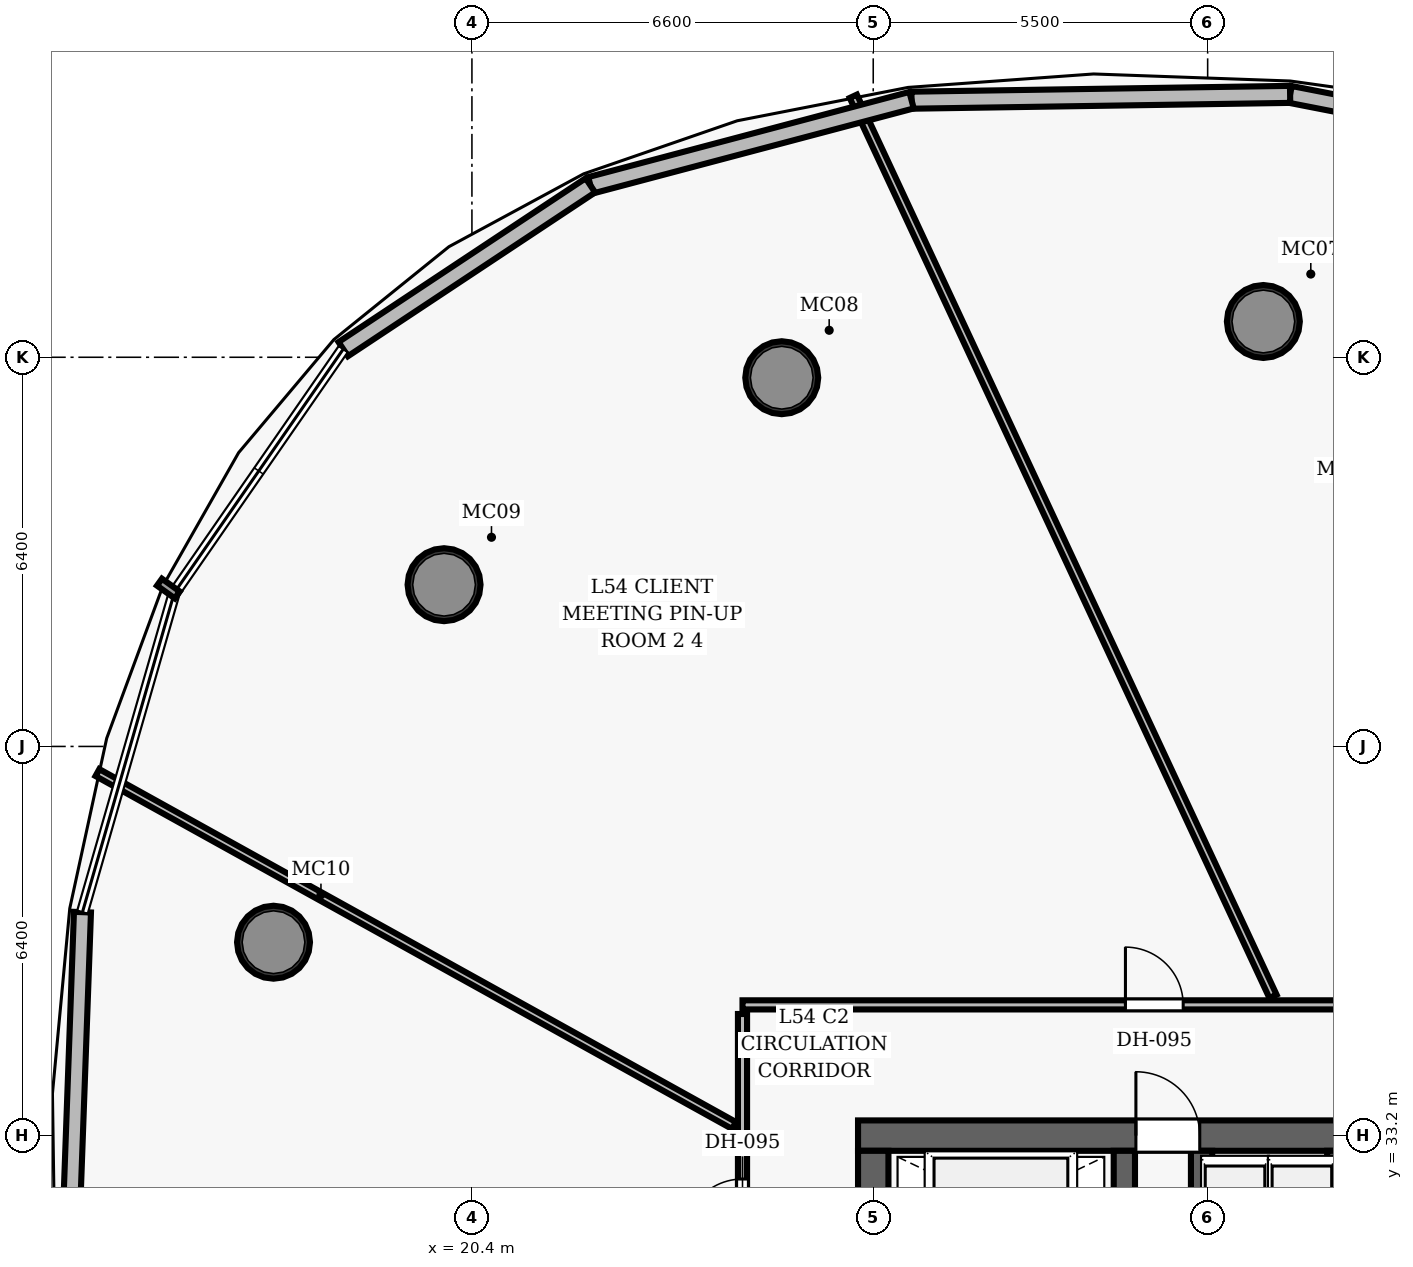
"""IFC4 building model, lengths in metres.
Left out: names, types, materials, properties, quantities, classifications, styles, units other than length and angle.
Written with IfcOpenShell. Run it as: python <this file> out.ifc"""

import sys

from ifc_helpers import new_model, si_unit, direction, frame, frame_2d, origin, origin_2d, place, context, subcontext, project, spatial, rectangle, hollow_circle, extrude, element, fill, save


model = new_model("IFC4")
c1 = context("Model", 3, precision=1e-05, world=origin(), true_north=direction((0.0, 1.0)))
c2 = subcontext(c1, "Body", "Model", "MODEL_VIEW")
j1 = project(units=[si_unit("LENGTHUNIT", "METRE"), si_unit("PLANEANGLEUNIT", "RADIAN")], contexts=[c1])
p1 = place(None, origin())
s1 = spatial("IfcSite", under=j1, at=p1, CompositionType="ELEMENT")
p2 = place(p1, origin())
s2 = spatial("IfcBuilding", under=s1, at=p2, CompositionType="ELEMENT")
p3 = place(p2, frame((0.0, 0.0, 213.55)))
s3 = spatial("IfcBuildingStorey", under=s2, at=p3, CompositionType="ELEMENT", Elevation=213.55)
p4 = place(p3, frame((26.75, 33.2, 0.0), z_axis=(0.0, 0.0, 1.0), x_axis=(1.0, 0.0, 0.0)))
e1 = element("IfcWall", 1, at=p4, inside=s3, PredefinedType="SHEAR", context=c2, shape_type="SweptSolid", body=[
    extrude(rectangle(XDim=22.5, YDim=0.5, at=frame_2d((11.25, 0.0))), origin(), (0.0, 0.0, 1.0), 3.85),
])
p5 = place(p4, frame((4.57, 0.0, 0.0)))
e2 = element("IfcOpeningElement", 2, at=p5, cuts=e1, PredefinedType="OPENING", context=c2, shape_type="SweptSolid", body=[
    extrude(rectangle(XDim=1.05, YDim=2.15, at=frame_2d((0.525, 1.075))), frame((0.0, 0.26, 0.0), z_axis=(0.0, -1.0, 0.0), x_axis=(1.0, 0.0, 0.0)), (0.0, 0.0, 1.0), 0.52),
])
p6 = place(p4, frame((14.47, 0.0, 0.0)))
e3 = element("IfcOpeningElement", 3, at=p6, cuts=e1, PredefinedType="OPENING", context=c2, shape_type="SweptSolid", body=[
    extrude(rectangle(XDim=1.05, YDim=2.15, at=frame_2d((0.525, 1.075))), frame((0.0, 0.26, 0.0), z_axis=(0.0, -1.0, 0.0), x_axis=(1.0, 0.0, 0.0)), (0.0, 0.0, 1.0), 0.52),
])
p7 = place(p3, frame((27.0, 19.05, 0.0), z_axis=(0.0, 0.0, 1.0), x_axis=(0.0, 1.0, 0.0)))
e4 = element("IfcWall", 4, at=p7, inside=s3, PredefinedType="SHEAR", context=c2, shape_type="SweptSolid", body=[
    extrude(rectangle(XDim=13.9, YDim=0.5, at=frame_2d((6.95, 0.0))), origin(), (0.0, 0.0, 1.0), 3.85),
])
p8 = place(p7, frame((8.2, 0.0, 0.0)))
e5 = element("IfcOpeningElement", 5, at=p8, cuts=e4, PredefinedType="OPENING", context=c2, shape_type="SweptSolid", body=[
    extrude(rectangle(XDim=1.05, YDim=2.15, at=frame_2d((0.525, 1.075))), frame((0.0, 0.26, 0.0), z_axis=(0.0, -1.0, 0.0), x_axis=(1.0, 0.0, 0.0)), (0.0, 0.0, 1.0), 0.52),
])
p9 = place(p3, frame((31.13, 19.05, 0.0), z_axis=(0.0, 0.0, 1.0), x_axis=(0.0, 1.0, 0.0)))
e6 = element("IfcWall", 6, at=p9, inside=s3, PredefinedType="SHEAR", context=c2, shape_type="SweptSolid", body=[
    extrude(rectangle(XDim=13.9, YDim=0.35, at=frame_2d((6.95, 0.0))), origin(), (0.0, 0.0, 1.0), 3.85),
])
for number, where, z_axis, x_axis in (
    (7, (33.416, 46.588, 0.0), (0.0, 0.0, 1.0), (1.0, 0.0, 0.0)),
    (8, (25.496, 45.664, 0.0), (0.0, 0.0, 1.0), (1.0, 0.0, 0.0)),
    (9, (19.942, 42.26, 0.0), (0.0, 0.0, 1.0), (1.0, 0.0, 0.0)),
    (10, (17.137, 36.381, 0.0), (0.0, 0.0, 1.0), (1.0, 0.0, 0.0)),
):
    element("IfcColumn", number, at=place(p3, frame(where, z_axis=z_axis, x_axis=x_axis)), inside=s3, PredefinedType="COLUMN", context=c2, shape_type="SweptSolid", body=[
        extrude(hollow_circle(Radius=0.6, WallThickness=0.05, at=origin_2d()), origin(), (0.0, 0.0, 1.0), 3.85),
    ])
p10 = place(p3, frame((34.64, 26.69, 0.0), z_axis=(0.0, 0.0, 1.0), x_axis=(0.0, 1.0, 0.0)))
e11 = element("IfcWall", 11, at=p10, inside=s3, PredefinedType="SHEAR", context=c2, shape_type="SweptSolid", body=[
    extrude(rectangle(XDim=6.26, YDim=0.35, at=frame_2d((3.13, 0.0))), origin(), (0.0, 0.0, 1.0), 3.85),
])
p11 = place(p3, frame((32.4, 30.22, 0.0), z_axis=(0.0, 0.0, 1.0), x_axis=(0.0, 1.0, 0.0)))
e12 = element("IfcWall", 12, at=p11, inside=s3, PredefinedType="SHEAR", context=c2, shape_type="SweptSolid", body=[
    extrude(rectangle(XDim=2.73, YDim=0.35, at=frame_2d((1.365, 0.0))), origin(), (0.0, 0.0, 1.0), 3.035),
])
p12 = place(p3, frame((24.85, 35.35, 0.0), z_axis=(0.0, 0.0, 1.0), x_axis=(1.0, 0.0, 0.0)))
e13 = element("IfcWall", 13, at=p12, inside=s3, PredefinedType="PARTITIONING", context=c2, shape_type="SweptSolid", body=[
    extrude(rectangle(XDim=26.0, YDim=0.15, at=frame_2d((13.0, 0.0))), origin(), (0.0, 0.0, 1.0), 3.035),
])
p13 = place(p12, frame((16.182, 0.0, 0.0)))
e14 = element("IfcOpeningElement", 14, at=p13, cuts=e13, PredefinedType="OPENING", context=c2, shape_type="SweptSolid", body=[
    extrude(rectangle(XDim=1.5, YDim=2.2, at=frame_2d((0.75, 1.1))), frame((0.0, 0.085, 0.0), z_axis=(0.0, -1.0, 0.0), x_axis=(1.0, 0.0, 0.0)), (0.0, 0.0, 1.0), 0.17),
])
p14 = place(p12, frame((10.36, 0.0, 0.0)))
e15 = element("IfcOpeningElement", 15, at=p14, cuts=e13, PredefinedType="OPENING", context=c2, shape_type="SweptSolid", body=[
    extrude(rectangle(XDim=0.95, YDim=2.15, at=frame_2d((0.475, 1.075))), frame((0.0, 0.085, 0.0), z_axis=(0.0, -1.0, 0.0), x_axis=(1.0, 0.0, 0.0)), (0.0, 0.0, 1.0), 0.17),
])
p15 = place(p12, frame((6.298, 0.0, 0.0)))
e16 = element("IfcOpeningElement", 16, at=p15, cuts=e13, PredefinedType="OPENING", context=c2, shape_type="SweptSolid", body=[
    extrude(rectangle(XDim=0.95, YDim=2.15, at=frame_2d((0.475, 1.075))), frame((0.0, 0.085, 0.0), z_axis=(0.0, -1.0, 0.0), x_axis=(1.0, 0.0, 0.0)), (0.0, 0.0, 1.0), 0.17),
])
p16 = place(p3, frame((24.85, 27.08, 0.0), z_axis=(0.0, 0.0, 1.0), x_axis=(0.0, 1.0, 0.0)))
e17 = element("IfcWall", 17, at=p16, inside=s3, PredefinedType="PARTITIONING", context=c2, shape_type="SweptSolid", body=[
    extrude(rectangle(XDim=8.12, YDim=0.15, at=frame_2d((4.06, 0.0))), origin(), (0.0, 0.0, 1.0), 3.035),
])
p17 = place(p16, frame((4.456, 0.0, 0.0)))
e18 = element("IfcOpeningElement", 18, at=p17, cuts=e17, PredefinedType="OPENING", context=c2, shape_type="SweptSolid", body=[
    extrude(rectangle(XDim=0.95, YDim=2.15, at=frame_2d((0.475, 1.075))), frame((0.0, 0.085, 0.0), z_axis=(0.0, -1.0, 0.0), x_axis=(1.0, 0.0, 0.0)), (0.0, 0.0, 1.0), 0.17),
])
p18 = place(p3, frame((33.575, 35.49, 0.0), z_axis=(0.0, 0.0, 1.0), x_axis=(-0.422608843955, 0.906312178563, 0.0)))
e19 = element("IfcWall", 19, at=p18, inside=s3, PredefinedType="PARTITIONING", context=c2, shape_type="SweptSolid", body=[
    extrude(rectangle(XDim=16.332, YDim=0.13, at=frame_2d((8.166, 0.0))), origin(), (0.0, 0.0, 1.0), 3.035),
])
p19 = place(p3, frame((24.71, 33.367, 0.0), z_axis=(0.0, 0.0, 1.0), x_axis=(-0.874613881737, 0.484820129402, 0.0)))
e20 = element("IfcWall", 20, at=p19, inside=s3, PredefinedType="PARTITIONING", context=c2, shape_type="SweptSolid", body=[
    extrude(rectangle(XDim=11.97, YDim=0.13, at=frame_2d((5.985, 0.0))), origin(), (0.0, 0.0, 1.0), 3.035),
])
p20 = place(p3, frame((33.856, 50.323, 0.0), z_axis=(0.0, 0.0, 1.0), x_axis=(0.981469964999, -0.191616042662, 0.0)))
e21 = element("IfcWall", 21, at=p20, inside=s3, PredefinedType="SOLIDWALL", context=c2, shape_type="SweptSolid", body=[
    extrude(rectangle(XDim=6.785, YDim=0.28, at=frame_2d((3.392, 0.0))), origin(), (0.0, 0.0, 1.0), 3.62),
])
p21 = place(p3, frame((27.63, 50.228, 0.0), z_axis=(0.0, 0.0, 1.0), x_axis=(0.999882465169, 0.015331531133, 0.0)))
e22 = element("IfcWall", 22, at=p21, inside=s3, PredefinedType="SOLIDWALL", context=c2, shape_type="SweptSolid", body=[
    extrude(rectangle(XDim=6.226, YDim=0.28, at=frame_2d((3.113, 0.0))), origin(), (0.0, 0.0, 1.0), 3.62),
])
p22 = place(p3, frame((22.348, 48.828, 0.0), z_axis=(0.0, 0.0, 1.0), x_axis=(0.966618709205, 0.256219185491, 0.0)))
e23 = element("IfcWall", 23, at=p22, inside=s3, PredefinedType="SOLIDWALL", context=c2, shape_type="SweptSolid", body=[
    extrude(rectangle(XDim=5.465, YDim=0.28, at=frame_2d((2.732, 0.0))), origin(), (0.0, 0.0, 1.0), 3.62),
])
p23 = place(p3, frame((18.283, 46.134, 0.0), z_axis=(0.0, 0.0, 1.0), x_axis=(0.833556909775, 0.55243359616, 0.0)))
e24 = element("IfcWall", 24, at=p23, inside=s3, PredefinedType="SOLIDWALL", context=c2, shape_type="SweptSolid", body=[
    extrude(rectangle(XDim=4.876, YDim=0.28, at=frame_2d((2.438, 0.0))), origin(), (0.0, 0.0, 1.0), 3.62),
])
p24 = place(p3, frame((13.769, 30.653, 0.0), z_axis=(0.0, 0.0, 1.0), x_axis=(0.036270554674, 0.999342006954, 0.0)))
e25 = element("IfcWall", 25, at=p24, inside=s3, PredefinedType="SOLIDWALL", context=c2, shape_type="SweptSolid", body=[
    extrude(rectangle(XDim=6.226, YDim=0.28, at=frame_2d((3.113, 0.0))), origin(), (0.0, 0.0, 1.0), 3.62),
])
p25 = place(p5, origin())
e26 = element("IfcDoor", 26, at=p25, inside=s3, OperationType="SINGLE_SWING_LEFT", PredefinedType="DOOR", context=c2, shape_type="SweptSolid", body=[
    extrude(rectangle(XDim=1.05, YDim=2.15, at=frame_2d((0.525, 1.075))), frame((0.0, 0.025, 0.0), z_axis=(0.0, -1.0, 0.0), x_axis=(1.0, 0.0, 0.0)), (0.0, 0.0, 1.0), 0.05),
])
fill(e2, e26)
p26 = place(p15, origin())
e27 = element("IfcDoor", 27, at=p26, inside=s3, OperationType="SINGLE_SWING_LEFT", PredefinedType="DOOR", context=c2, shape_type="SweptSolid", body=[
    extrude(rectangle(XDim=0.95, YDim=2.15, at=frame_2d((0.475, 1.075))), frame((0.0, 0.025, 0.0), z_axis=(0.0, -1.0, 0.0), x_axis=(1.0, 0.0, 0.0)), (0.0, 0.0, 1.0), 0.05),
])
fill(e16, e27)
p27 = place(p17, origin())
e28 = element("IfcDoor", 28, at=p27, inside=s3, OperationType="SINGLE_SWING_LEFT", PredefinedType="DOOR", context=c2, shape_type="SweptSolid", body=[
    extrude(rectangle(XDim=0.95, YDim=2.15, at=frame_2d((0.475, 1.075))), frame((0.0, 0.025, 0.0), z_axis=(0.0, -1.0, 0.0), x_axis=(1.0, 0.0, 0.0)), (0.0, 0.0, 1.0), 0.05),
])
fill(e18, e28)
save(model, sys.argv[1])
